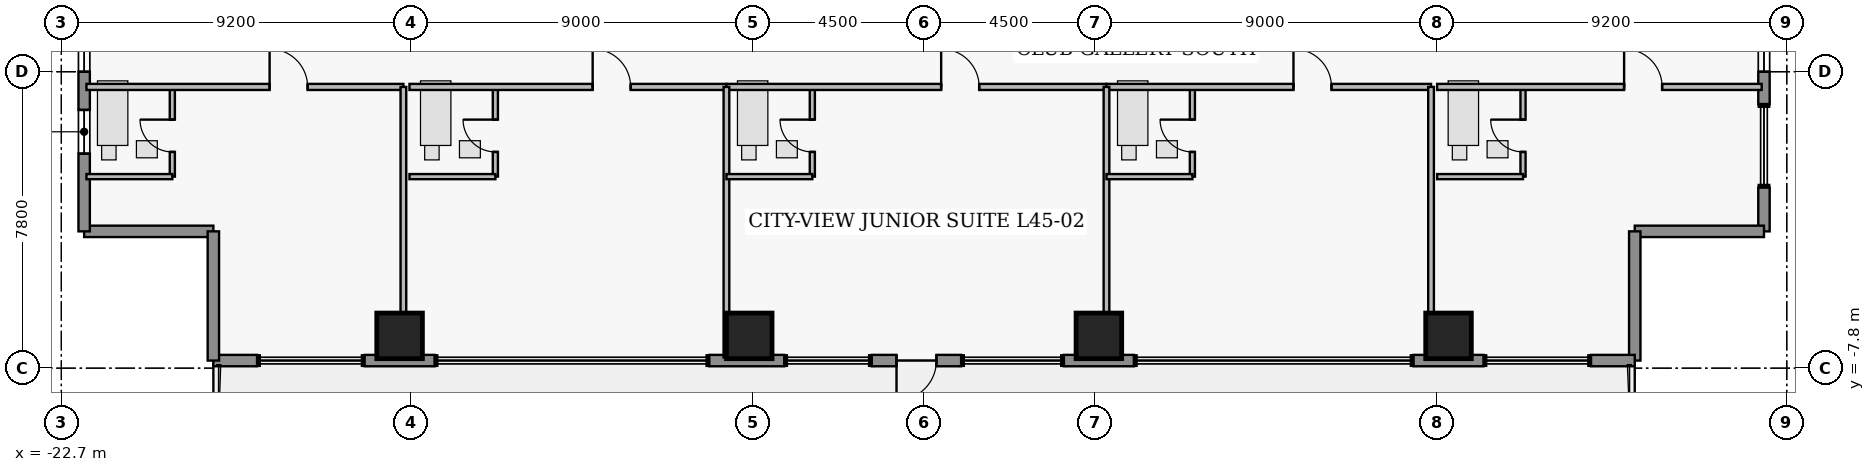
"""IFC4 building model, lengths in metres.
Left out: names, types, materials, properties, quantities, classifications, styles, units other than length and angle.
Written with IfcOpenShell. Run it as: python <this file> out.ifc"""

import sys

from ifc_helpers import new_model, si_unit, direction, frame, frame_2d, origin, origin_2d, place, context, subcontext, project, spatial, rectangle, extrude, element, fill, save


model = new_model("IFC4")
c1 = context("Model", 3, precision=1e-05, world=origin(), true_north=direction((0.0, 1.0)))
c2 = subcontext(c1, "Body", "Model", "MODEL_VIEW")
j1 = project(units=[si_unit("LENGTHUNIT", "METRE"), si_unit("PLANEANGLEUNIT", "RADIAN")], contexts=[c1])
p1 = place(None, origin())
s1 = spatial("IfcSite", under=j1, at=p1, CompositionType="ELEMENT")
p2 = place(p1, origin())
s2 = spatial("IfcBuilding", under=s1, at=p2, CompositionType="ELEMENT")
p3 = place(p2, frame((0.0, 0.0, 181.15)))
s3 = spatial("IfcBuildingStorey", under=s2, at=p3, CompositionType="ELEMENT", Elevation=181.15)
for number, where, z_axis, x_axis in (
    (1, (-13.8, -6.95, 0.0), (0.0, 0.0, 1.0), (1.0, 0.0, 0.0)),
    (2, (-4.6, -6.95, 0.0), (0.0, 0.0, 1.0), (1.0, 0.0, 0.0)),
    (3, (4.6, -6.95, 0.0), (0.0, 0.0, 1.0), (1.0, 0.0, 0.0)),
    (4, (13.8, -6.95, 0.0), (0.0, 0.0, 1.0), (1.0, 0.0, 0.0)),
):
    element("IfcColumn", number, at=place(p3, frame(where, z_axis=z_axis, x_axis=x_axis)), inside=s3, PredefinedType="COLUMN", context=c2, shape_type="SweptSolid", body=[
        extrude(rectangle(XDim=1.2, YDim=1.2, at=origin_2d()), origin(), (0.0, 0.0, 1.0), 3.75),
    ])
p4 = place(p3, frame((-18.7, -4.2, 0.0), z_axis=(0.0, 0.0, 1.0), x_axis=(-1.0, 0.0, 0.0)))
e5 = element("IfcWall", 5, at=p4, inside=s3, PredefinedType="STANDARD", context=c2, shape_type="SweptSolid", body=[
    extrude(rectangle(XDim=3.4, YDim=0.3, at=frame_2d((1.7, 0.0))), origin(), (0.0, 0.0, 1.0), 3.53),
])
p5 = place(p3, frame((-22.1, -4.2, 0.0), z_axis=(0.0, 0.0, 1.0), x_axis=(0.0, 1.0, 0.0)))
e6 = element("IfcWall", 6, at=p5, inside=s3, PredefinedType="STANDARD", context=c2, shape_type="SweptSolid", body=[
    extrude(rectangle(XDim=6.2, YDim=0.3, at=frame_2d((3.1, 0.0))), origin(), (0.0, 0.0, 1.0), 3.53),
])
p6 = place(p5, frame((2.045, 0.0, 0.95)))
e7 = element("IfcOpeningElement", 7, at=p6, cuts=e6, PredefinedType="OPENING", context=c2, shape_type="SweptSolid", body=[
    extrude(rectangle(XDim=1.15, YDim=1.55, at=frame_2d((0.575, 0.775))), frame((0.0, 0.16, 0.0), z_axis=(0.0, -1.0, 0.0), x_axis=(1.0, 0.0, 0.0)), (0.0, 0.0, 1.0), 0.32),
])
p7 = place(p5, frame((4.2, 0.0, 0.95)))
e8 = element("IfcOpeningElement", 8, at=p7, cuts=e6, PredefinedType="OPENING", context=c2, shape_type="SweptSolid", body=[
    extrude(rectangle(XDim=1.15, YDim=1.55, at=frame_2d((0.575, 0.775))), frame((0.0, 0.16, 0.0), z_axis=(0.0, -1.0, 0.0), x_axis=(1.0, 0.0, 0.0)), (0.0, 0.0, 1.0), 0.32),
])
p8 = place(p3, frame((22.1, 2.0, 0.0), z_axis=(0.0, 0.0, 1.0), x_axis=(0.0, -1.0, 0.0)))
e9 = element("IfcWall", 9, at=p8, inside=s3, PredefinedType="STANDARD", context=c2, shape_type="SweptSolid", body=[
    extrude(rectangle(XDim=2.85, YDim=0.3, at=frame_2d((1.425, 0.0))), origin(), (0.0, 0.0, 1.0), 3.53),
])
p9 = place(p8, frame((0.85, 0.0, 0.95)))
e10 = element("IfcOpeningElement", 10, at=p9, cuts=e9, PredefinedType="OPENING", context=c2, shape_type="SweptSolid", body=[
    extrude(rectangle(XDim=1.15, YDim=1.55, at=frame_2d((0.575, 0.775))), frame((0.0, 0.16, 0.0), z_axis=(0.0, -1.0, 0.0), x_axis=(1.0, 0.0, 0.0)), (0.0, 0.0, 1.0), 0.32),
])
p10 = place(p3, frame((22.1, -3.05, 0.0), z_axis=(0.0, 0.0, 1.0), x_axis=(0.0, -1.0, 0.0)))
e11 = element("IfcWall", 11, at=p10, inside=s3, PredefinedType="STANDARD", context=c2, shape_type="SweptSolid", body=[
    extrude(rectangle(XDim=1.15, YDim=0.3, at=frame_2d((0.575, 0.0))), origin(), (0.0, 0.0, 1.0), 3.53),
])
for number, where, z_axis, x_axis in (
    (12, (22.1, -4.2, 0.0), (0.0, 0.0, 1.0), (-1.0, 0.0, 0.0)),
    (13, (18.7, -4.2, 0.0), (0.0, 0.0, 1.0), (0.0, -1.0, 0.0)),
):
    element("IfcWall", number, at=place(p3, frame(where, z_axis=z_axis, x_axis=x_axis)), inside=s3, PredefinedType="STANDARD", context=c2, shape_type="SweptSolid", body=[
        extrude(rectangle(XDim=3.4, YDim=0.3, at=frame_2d((1.7, 0.0))), origin(), (0.0, 0.0, 1.0), 3.53),
    ])
p11 = place(p3, frame((18.7, -7.6, 0.0), z_axis=(0.0, 0.0, 1.0), x_axis=(-1.0, 0.0, 0.0)))
e14 = element("IfcWall", 14, at=p11, inside=s3, PredefinedType="STANDARD", context=c2, shape_type="SweptSolid", body=[
    extrude(rectangle(XDim=1.15, YDim=0.3, at=frame_2d((0.575, 0.0))), origin(), (0.0, 0.0, 1.0), 3.53),
])
for number, where, z_axis, x_axis in (
    (15, (14.72, -7.6, 0.0), (0.0, 0.0, 1.0), (-1.0, 0.0, 0.0)),
    (16, (5.52, -7.6, 0.0), (0.0, 0.0, 1.0), (-1.0, 0.0, 0.0)),
):
    element("IfcWall", number, at=place(p3, frame(where, z_axis=z_axis, x_axis=x_axis)), inside=s3, PredefinedType="STANDARD", context=c2, shape_type="SweptSolid", body=[
        extrude(rectangle(XDim=1.84, YDim=0.3, at=frame_2d((0.92, 0.0))), origin(), (0.0, 0.0, 1.0), 3.53),
    ])
p12 = place(p3, frame((0.975, -7.6, 0.0), z_axis=(0.0, 0.0, 1.0), x_axis=(-1.0, 0.0, 0.0)))
e17 = element("IfcWall", 17, at=p12, inside=s3, PredefinedType="STANDARD", context=c2, shape_type="SweptSolid", body=[
    extrude(rectangle(XDim=2.35, YDim=0.3, at=frame_2d((1.175, 0.0))), origin(), (0.0, 0.0, 1.0), 3.53),
])
p13 = place(p12, frame((0.65, 0.0, 0.0)))
e18 = element("IfcOpeningElement", 18, at=p13, cuts=e17, PredefinedType="OPENING", context=c2, shape_type="SweptSolid", body=[
    extrude(rectangle(XDim=1.05, YDim=2.2, at=frame_2d((0.525, 1.1))), frame((0.0, 0.16, 0.0), z_axis=(0.0, -1.0, 0.0), x_axis=(1.0, 0.0, 0.0)), (0.0, 0.0, 1.0), 0.32),
])
p14 = place(p3, frame((-3.68, -7.6, 0.0), z_axis=(0.0, 0.0, 1.0), x_axis=(-1.0, 0.0, 0.0)))
e19 = element("IfcWall", 19, at=p14, inside=s3, PredefinedType="STANDARD", context=c2, shape_type="SweptSolid", body=[
    extrude(rectangle(XDim=1.97, YDim=0.3, at=frame_2d((0.985, 0.0))), origin(), (0.0, 0.0, 1.0), 3.53),
])
p15 = place(p3, frame((-12.88, -7.6, 0.0), z_axis=(0.0, 0.0, 1.0), x_axis=(-1.0, 0.0, 0.0)))
e20 = element("IfcWall", 20, at=p15, inside=s3, PredefinedType="STANDARD", context=c2, shape_type="SweptSolid", body=[
    extrude(rectangle(XDim=1.84, YDim=0.3, at=frame_2d((0.92, 0.0))), origin(), (0.0, 0.0, 1.0), 3.53),
])
p16 = place(p3, frame((-17.55, -7.6, 0.0), z_axis=(0.0, 0.0, 1.0), x_axis=(-1.0, 0.0, 0.0)))
e21 = element("IfcWall", 21, at=p16, inside=s3, PredefinedType="STANDARD", context=c2, shape_type="SweptSolid", body=[
    extrude(rectangle(XDim=1.15, YDim=0.3, at=frame_2d((0.575, 0.0))), origin(), (0.0, 0.0, 1.0), 3.53),
])
p17 = place(p3, frame((-18.7, -7.6, 0.0), z_axis=(0.0, 0.0, 1.0), x_axis=(0.0, 1.0, 0.0)))
e22 = element("IfcWall", 22, at=p17, inside=s3, PredefinedType="STANDARD", context=c2, shape_type="SweptSolid", body=[
    extrude(rectangle(XDim=3.4, YDim=0.3, at=frame_2d((1.7, 0.0))), origin(), (0.0, 0.0, 1.0), 3.53),
])
p18 = place(p3, frame((-19.78, -2.76, 0.0), z_axis=(0.0, 0.0, 1.0), x_axis=(0.0, 1.0, 0.0)))
e23 = element("IfcWall", 23, at=p18, inside=s3, PredefinedType="PLUMBINGWALL", context=c2, shape_type="SweptSolid", body=[
    extrude(rectangle(XDim=2.36, YDim=0.135, at=frame_2d((1.18, 0.0))), origin(), (0.0, 0.0, 1.0), 3.53),
])
p19 = place(p18, frame((0.65, 0.0, 0.0)))
e24 = element("IfcOpeningElement", 24, at=p19, cuts=e23, PredefinedType="OPENING", context=c2, shape_type="SweptSolid", body=[
    extrude(rectangle(XDim=0.85, YDim=2.1, at=frame_2d((0.425, 1.05))), frame((0.0, 0.077, 0.0), z_axis=(0.0, -1.0, 0.0), x_axis=(1.0, 0.0, 0.0)), (0.0, 0.0, 1.0), 0.155),
])
p20 = place(p3, frame((-22.04, -0.4, 0.0), z_axis=(0.0, 0.0, 1.0), x_axis=(1.0, 0.0, 0.0)))
e25 = element("IfcWall", 25, at=p20, inside=s3, PredefinedType="PARTITIONING", context=c2, shape_type="SweptSolid", body=[
    extrude(rectangle(XDim=8.34, YDim=0.16, at=frame_2d((4.17, 0.0))), origin(), (0.0, 0.0, 1.0), 3.53),
])
p21 = place(p20, frame((4.82, 0.0, 0.0)))
e26 = element("IfcOpeningElement", 26, at=p21, cuts=e25, PredefinedType="OPENING", context=c2, shape_type="SweptSolid", body=[
    extrude(rectangle(XDim=1.0, YDim=2.15, at=frame_2d((0.5, 1.075))), frame((0.0, 0.09, 0.0), z_axis=(0.0, -1.0, 0.0), x_axis=(1.0, 0.0, 0.0)), (0.0, 0.0, 1.0), 0.18),
])
p22 = place(p3, frame((-11.28, -2.76, 0.0), z_axis=(0.0, 0.0, 1.0), x_axis=(0.0, 1.0, 0.0)))
e27 = element("IfcWall", 27, at=p22, inside=s3, PredefinedType="PLUMBINGWALL", context=c2, shape_type="SweptSolid", body=[
    extrude(rectangle(XDim=2.36, YDim=0.135, at=frame_2d((1.18, 0.0))), origin(), (0.0, 0.0, 1.0), 3.53),
])
p23 = place(p22, frame((0.65, 0.0, 0.0)))
e28 = element("IfcOpeningElement", 28, at=p23, cuts=e27, PredefinedType="OPENING", context=c2, shape_type="SweptSolid", body=[
    extrude(rectangle(XDim=0.85, YDim=2.1, at=frame_2d((0.425, 1.05))), frame((0.0, 0.077, 0.0), z_axis=(0.0, -1.0, 0.0), x_axis=(1.0, 0.0, 0.0)), (0.0, 0.0, 1.0), 0.155),
])
p24 = place(p3, frame((-13.54, -0.4, 0.0), z_axis=(0.0, 0.0, 1.0), x_axis=(1.0, 0.0, 0.0)))
e29 = element("IfcWall", 29, at=p24, inside=s3, PredefinedType="PARTITIONING", context=c2, shape_type="SweptSolid", body=[
    extrude(rectangle(XDim=8.34, YDim=0.16, at=frame_2d((4.17, 0.0))), origin(), (0.0, 0.0, 1.0), 3.53),
])
p25 = place(p24, frame((4.82, 0.0, 0.0)))
e30 = element("IfcOpeningElement", 30, at=p25, cuts=e29, PredefinedType="OPENING", context=c2, shape_type="SweptSolid", body=[
    extrude(rectangle(XDim=1.0, YDim=2.15, at=frame_2d((0.5, 1.075))), frame((0.0, 0.09, 0.0), z_axis=(0.0, -1.0, 0.0), x_axis=(1.0, 0.0, 0.0)), (0.0, 0.0, 1.0), 0.18),
])
p26 = place(p3, frame((-2.94, -2.76, 0.0), z_axis=(0.0, 0.0, 1.0), x_axis=(0.0, 1.0, 0.0)))
e31 = element("IfcWall", 31, at=p26, inside=s3, PredefinedType="PLUMBINGWALL", context=c2, shape_type="SweptSolid", body=[
    extrude(rectangle(XDim=2.36, YDim=0.135, at=frame_2d((1.18, 0.0))), origin(), (0.0, 0.0, 1.0), 3.53),
])
p27 = place(p26, frame((0.65, 0.0, 0.0)))
e32 = element("IfcOpeningElement", 32, at=p27, cuts=e31, PredefinedType="OPENING", context=c2, shape_type="SweptSolid", body=[
    extrude(rectangle(XDim=0.85, YDim=2.1, at=frame_2d((0.425, 1.05))), frame((0.0, 0.077, 0.0), z_axis=(0.0, -1.0, 0.0), x_axis=(1.0, 0.0, 0.0)), (0.0, 0.0, 1.0), 0.155),
])
p28 = place(p3, frame((-5.2, -0.4, 0.0), z_axis=(0.0, 0.0, 1.0), x_axis=(1.0, 0.0, 0.0)))
e33 = element("IfcWall", 33, at=p28, inside=s3, PredefinedType="PARTITIONING", context=c2, shape_type="SweptSolid", body=[
    extrude(rectangle(XDim=10.0, YDim=0.16, at=frame_2d((5.0, 0.0))), origin(), (0.0, 0.0, 1.0), 3.53),
])
p29 = place(p28, frame((5.65, 0.0, 0.0)))
e34 = element("IfcOpeningElement", 34, at=p29, cuts=e33, PredefinedType="OPENING", context=c2, shape_type="SweptSolid", body=[
    extrude(rectangle(XDim=1.0, YDim=2.15, at=frame_2d((0.5, 1.075))), frame((0.0, 0.09, 0.0), z_axis=(0.0, -1.0, 0.0), x_axis=(1.0, 0.0, 0.0)), (0.0, 0.0, 1.0), 0.18),
])
p30 = place(p3, frame((7.06, -2.76, 0.0), z_axis=(0.0, 0.0, 1.0), x_axis=(0.0, 1.0, 0.0)))
e35 = element("IfcWall", 35, at=p30, inside=s3, PredefinedType="PLUMBINGWALL", context=c2, shape_type="SweptSolid", body=[
    extrude(rectangle(XDim=2.36, YDim=0.135, at=frame_2d((1.18, 0.0))), origin(), (0.0, 0.0, 1.0), 3.53),
])
p31 = place(p30, frame((0.65, 0.0, 0.0)))
e36 = element("IfcOpeningElement", 36, at=p31, cuts=e35, PredefinedType="OPENING", context=c2, shape_type="SweptSolid", body=[
    extrude(rectangle(XDim=0.85, YDim=2.1, at=frame_2d((0.425, 1.05))), frame((0.0, 0.077, 0.0), z_axis=(0.0, -1.0, 0.0), x_axis=(1.0, 0.0, 0.0)), (0.0, 0.0, 1.0), 0.155),
])
p32 = place(p3, frame((4.8, -0.4, 0.0), z_axis=(0.0, 0.0, 1.0), x_axis=(1.0, 0.0, 0.0)))
e37 = element("IfcWall", 37, at=p32, inside=s3, PredefinedType="PARTITIONING", context=c2, shape_type="SweptSolid", body=[
    extrude(rectangle(XDim=8.54, YDim=0.16, at=frame_2d((4.27, 0.0))), origin(), (0.0, 0.0, 1.0), 3.53),
])
p33 = place(p32, frame((4.92, 0.0, 0.0)))
e38 = element("IfcOpeningElement", 38, at=p33, cuts=e37, PredefinedType="OPENING", context=c2, shape_type="SweptSolid", body=[
    extrude(rectangle(XDim=1.0, YDim=2.15, at=frame_2d((0.5, 1.075))), frame((0.0, 0.09, 0.0), z_axis=(0.0, -1.0, 0.0), x_axis=(1.0, 0.0, 0.0)), (0.0, 0.0, 1.0), 0.18),
])
p34 = place(p3, frame((15.76, -2.76, 0.0), z_axis=(0.0, 0.0, 1.0), x_axis=(0.0, 1.0, 0.0)))
e39 = element("IfcWall", 39, at=p34, inside=s3, PredefinedType="PLUMBINGWALL", context=c2, shape_type="SweptSolid", body=[
    extrude(rectangle(XDim=2.36, YDim=0.135, at=frame_2d((1.18, 0.0))), origin(), (0.0, 0.0, 1.0), 3.53),
])
p35 = place(p34, frame((0.65, 0.0, 0.0)))
e40 = element("IfcOpeningElement", 40, at=p35, cuts=e39, PredefinedType="OPENING", context=c2, shape_type="SweptSolid", body=[
    extrude(rectangle(XDim=0.85, YDim=2.1, at=frame_2d((0.425, 1.05))), frame((0.0, 0.077, 0.0), z_axis=(0.0, -1.0, 0.0), x_axis=(1.0, 0.0, 0.0)), (0.0, 0.0, 1.0), 0.155),
])
p36 = place(p3, frame((13.5, -0.4, 0.0), z_axis=(0.0, 0.0, 1.0), x_axis=(1.0, 0.0, 0.0)))
e41 = element("IfcWall", 41, at=p36, inside=s3, PredefinedType="PARTITIONING", context=c2, shape_type="SweptSolid", body=[
    extrude(rectangle(XDim=8.54, YDim=0.16, at=frame_2d((4.27, 0.0))), origin(), (0.0, 0.0, 1.0), 3.53),
])
p37 = place(p36, frame((4.92, 0.0, 0.0)))
e42 = element("IfcOpeningElement", 42, at=p37, cuts=e41, PredefinedType="OPENING", context=c2, shape_type="SweptSolid", body=[
    extrude(rectangle(XDim=1.0, YDim=2.15, at=frame_2d((0.5, 1.075))), frame((0.0, 0.09, 0.0), z_axis=(0.0, -1.0, 0.0), x_axis=(1.0, 0.0, 0.0)), (0.0, 0.0, 1.0), 0.18),
])
p38 = place(p3, frame((-22.04, -2.76, 0.0), z_axis=(0.0, 0.0, 1.0), x_axis=(1.0, 0.0, 0.0)))
e43 = element("IfcWall", 43, at=p38, inside=s3, PredefinedType="PLUMBINGWALL", context=c2, shape_type="SweptSolid", body=[
    extrude(rectangle(XDim=2.26, YDim=0.135, at=frame_2d((1.13, 0.0))), origin(), (0.0, 0.0, 1.0), 3.53),
])
p39 = place(p3, frame((-13.7, -7.52, 0.0), z_axis=(0.0, 0.0, 1.0), x_axis=(0.0, 1.0, 0.0)))
e44 = element("IfcWall", 44, at=p39, inside=s3, PredefinedType="PARTITIONING", context=c2, shape_type="SweptSolid", body=[
    extrude(rectangle(XDim=7.12, YDim=0.15, at=frame_2d((3.56, 0.0))), origin(), (0.0, 0.0, 1.0), 2.923),
])
p40 = place(p3, frame((-13.54, -2.76, 0.0), z_axis=(0.0, 0.0, 1.0), x_axis=(1.0, 0.0, 0.0)))
e45 = element("IfcWall", 45, at=p40, inside=s3, PredefinedType="PLUMBINGWALL", context=c2, shape_type="SweptSolid", body=[
    extrude(rectangle(XDim=2.26, YDim=0.135, at=frame_2d((1.13, 0.0))), origin(), (0.0, 0.0, 1.0), 3.124),
])
p41 = place(p3, frame((-5.2, -7.52, 0.0), z_axis=(0.0, 0.0, 1.0), x_axis=(0.0, 1.0, 0.0)))
e46 = element("IfcWall", 46, at=p41, inside=s3, PredefinedType="PARTITIONING", context=c2, shape_type="SweptSolid", body=[
    extrude(rectangle(XDim=7.12, YDim=0.15, at=frame_2d((3.56, 0.0))), origin(), (0.0, 0.0, 1.0), 3.53),
])
p42 = place(p3, frame((-5.2, -2.76, 0.0), z_axis=(0.0, 0.0, 1.0), x_axis=(1.0, 0.0, 0.0)))
e47 = element("IfcWall", 47, at=p42, inside=s3, PredefinedType="PLUMBINGWALL", context=c2, shape_type="SweptSolid", body=[
    extrude(rectangle(XDim=2.26, YDim=0.135, at=frame_2d((1.13, 0.0))), origin(), (0.0, 0.0, 1.0), 3.124),
])
p43 = place(p3, frame((4.8, -7.52, 0.0), z_axis=(0.0, 0.0, 1.0), x_axis=(0.0, 1.0, 0.0)))
e48 = element("IfcWall", 48, at=p43, inside=s3, PredefinedType="PARTITIONING", context=c2, shape_type="SweptSolid", body=[
    extrude(rectangle(XDim=7.12, YDim=0.15, at=frame_2d((3.56, 0.0))), origin(), (0.0, 0.0, 1.0), 2.923),
])
p44 = place(p3, frame((4.8, -2.76, 0.0), z_axis=(0.0, 0.0, 1.0), x_axis=(1.0, 0.0, 0.0)))
e49 = element("IfcWall", 49, at=p44, inside=s3, PredefinedType="PLUMBINGWALL", context=c2, shape_type="SweptSolid", body=[
    extrude(rectangle(XDim=2.26, YDim=0.135, at=frame_2d((1.13, 0.0))), origin(), (0.0, 0.0, 1.0), 3.124),
])
p45 = place(p3, frame((13.34, -7.52, 0.0), z_axis=(0.0, 0.0, 1.0), x_axis=(0.0, 1.0, 0.0)))
e50 = element("IfcWall", 50, at=p45, inside=s3, PredefinedType="PARTITIONING", context=c2, shape_type="SweptSolid", body=[
    extrude(rectangle(XDim=7.12, YDim=0.15, at=frame_2d((3.56, 0.0))), origin(), (0.0, 0.0, 1.0), 2.923),
])
p46 = place(p3, frame((13.5, -2.76, 0.0), z_axis=(0.0, 0.0, 1.0), x_axis=(1.0, 0.0, 0.0)))
e51 = element("IfcWall", 51, at=p46, inside=s3, PredefinedType="PLUMBINGWALL", context=c2, shape_type="SweptSolid", body=[
    extrude(rectangle(XDim=2.26, YDim=0.135, at=frame_2d((1.13, 0.0))), origin(), (0.0, 0.0, 1.0), 3.53),
])
p47 = place(p6, origin())
e52 = element("IfcWindow", 52, at=p47, inside=s3, PartitioningType="SINGLE_PANEL", PredefinedType="WINDOW", context=c2, shape_type="SweptSolid", body=[
    extrude(rectangle(XDim=1.15, YDim=1.55, at=frame_2d((0.575, 0.775))), frame((0.0, 0.03, 0.0), z_axis=(0.0, -1.0, 0.0), x_axis=(1.0, 0.0, 0.0)), (0.0, 0.0, 1.0), 0.06),
])
fill(e7, e52)
p48 = place(p7, origin())
e53 = element("IfcWindow", 53, at=p48, inside=s3, PartitioningType="SINGLE_PANEL", PredefinedType="WINDOW", context=c2, shape_type="SweptSolid", body=[
    extrude(rectangle(XDim=1.15, YDim=1.55, at=frame_2d((0.575, 0.775))), frame((0.0, 0.03, 0.0), z_axis=(0.0, -1.0, 0.0), x_axis=(1.0, 0.0, 0.0)), (0.0, 0.0, 1.0), 0.06),
])
fill(e8, e53)
p49 = place(p9, origin())
e54 = element("IfcWindow", 54, at=p49, inside=s3, PartitioningType="SINGLE_PANEL", PredefinedType="WINDOW", context=c2, shape_type="SweptSolid", body=[
    extrude(rectangle(XDim=1.15, YDim=1.55, at=frame_2d((0.575, 0.775))), frame((0.0, 0.03, 0.0), z_axis=(0.0, -1.0, 0.0), x_axis=(1.0, 0.0, 0.0)), (0.0, 0.0, 1.0), 0.06),
])
fill(e10, e54)
p50 = place(p13, origin())
e55 = element("IfcDoor", 55, at=p50, inside=s3, OperationType="SINGLE_SWING_RIGHT", PredefinedType="DOOR", context=c2, shape_type="SweptSolid", body=[
    extrude(rectangle(XDim=1.05, YDim=2.2, at=frame_2d((0.525, 1.1))), frame((0.0, 0.025, 0.0), z_axis=(0.0, -1.0, 0.0), x_axis=(1.0, 0.0, 0.0)), (0.0, 0.0, 1.0), 0.05),
])
fill(e18, e55)
p51 = place(p19, origin())
e56 = element("IfcDoor", 56, at=p51, inside=s3, OperationType="SINGLE_SWING_RIGHT", PredefinedType="DOOR", context=c2, shape_type="SweptSolid", body=[
    extrude(rectangle(XDim=0.85, YDim=2.1, at=frame_2d((0.425, 1.05))), frame((0.0, 0.025, 0.0), z_axis=(0.0, -1.0, 0.0), x_axis=(1.0, 0.0, 0.0)), (0.0, 0.0, 1.0), 0.05),
])
fill(e24, e56)
p52 = place(p21, origin())
e57 = element("IfcDoor", 57, at=p52, inside=s3, OperationType="SINGLE_SWING_LEFT", PredefinedType="DOOR", context=c2, shape_type="SweptSolid", body=[
    extrude(rectangle(XDim=1.0, YDim=2.15, at=frame_2d((0.5, 1.075))), frame((0.0, 0.025, 0.0), z_axis=(0.0, -1.0, 0.0), x_axis=(1.0, 0.0, 0.0)), (0.0, 0.0, 1.0), 0.05),
])
fill(e26, e57)
p53 = place(p23, origin())
e58 = element("IfcDoor", 58, at=p53, inside=s3, OperationType="SINGLE_SWING_RIGHT", PredefinedType="DOOR", context=c2, shape_type="SweptSolid", body=[
    extrude(rectangle(XDim=0.85, YDim=2.1, at=frame_2d((0.425, 1.05))), frame((0.0, 0.025, 0.0), z_axis=(0.0, -1.0, 0.0), x_axis=(1.0, 0.0, 0.0)), (0.0, 0.0, 1.0), 0.05),
])
fill(e28, e58)
p54 = place(p25, origin())
e59 = element("IfcDoor", 59, at=p54, inside=s3, OperationType="SINGLE_SWING_LEFT", PredefinedType="DOOR", context=c2, shape_type="SweptSolid", body=[
    extrude(rectangle(XDim=1.0, YDim=2.15, at=frame_2d((0.5, 1.075))), frame((0.0, 0.025, 0.0), z_axis=(0.0, -1.0, 0.0), x_axis=(1.0, 0.0, 0.0)), (0.0, 0.0, 1.0), 0.05),
])
fill(e30, e59)
p55 = place(p27, origin())
e60 = element("IfcDoor", 60, at=p55, inside=s3, OperationType="SINGLE_SWING_RIGHT", PredefinedType="DOOR", context=c2, shape_type="SweptSolid", body=[
    extrude(rectangle(XDim=0.85, YDim=2.1, at=frame_2d((0.425, 1.05))), frame((0.0, 0.025, 0.0), z_axis=(0.0, -1.0, 0.0), x_axis=(1.0, 0.0, 0.0)), (0.0, 0.0, 1.0), 0.05),
])
fill(e32, e60)
p56 = place(p29, origin())
e61 = element("IfcDoor", 61, at=p56, inside=s3, OperationType="SINGLE_SWING_LEFT", PredefinedType="DOOR", context=c2, shape_type="SweptSolid", body=[
    extrude(rectangle(XDim=1.0, YDim=2.15, at=frame_2d((0.5, 1.075))), frame((0.0, 0.025, 0.0), z_axis=(0.0, -1.0, 0.0), x_axis=(1.0, 0.0, 0.0)), (0.0, 0.0, 1.0), 0.05),
])
fill(e34, e61)
p57 = place(p31, origin())
e62 = element("IfcDoor", 62, at=p57, inside=s3, OperationType="SINGLE_SWING_RIGHT", PredefinedType="DOOR", context=c2, shape_type="SweptSolid", body=[
    extrude(rectangle(XDim=0.85, YDim=2.1, at=frame_2d((0.425, 1.05))), frame((0.0, 0.025, 0.0), z_axis=(0.0, -1.0, 0.0), x_axis=(1.0, 0.0, 0.0)), (0.0, 0.0, 1.0), 0.05),
])
fill(e36, e62)
p58 = place(p33, origin())
e63 = element("IfcDoor", 63, at=p58, inside=s3, OperationType="SINGLE_SWING_LEFT", PredefinedType="DOOR", context=c2, shape_type="SweptSolid", body=[
    extrude(rectangle(XDim=1.0, YDim=2.15, at=frame_2d((0.5, 1.075))), frame((0.0, 0.025, 0.0), z_axis=(0.0, -1.0, 0.0), x_axis=(1.0, 0.0, 0.0)), (0.0, 0.0, 1.0), 0.05),
])
fill(e38, e63)
p59 = place(p35, origin())
e64 = element("IfcDoor", 64, at=p59, inside=s3, OperationType="SINGLE_SWING_RIGHT", PredefinedType="DOOR", context=c2, shape_type="SweptSolid", body=[
    extrude(rectangle(XDim=0.85, YDim=2.1, at=frame_2d((0.425, 1.05))), frame((0.0, 0.025, 0.0), z_axis=(0.0, -1.0, 0.0), x_axis=(1.0, 0.0, 0.0)), (0.0, 0.0, 1.0), 0.05),
])
fill(e40, e64)
p60 = place(p37, origin())
e65 = element("IfcDoor", 65, at=p60, inside=s3, OperationType="SINGLE_SWING_LEFT", PredefinedType="DOOR", context=c2, shape_type="SweptSolid", body=[
    extrude(rectangle(XDim=1.0, YDim=2.15, at=frame_2d((0.5, 1.075))), frame((0.0, 0.025, 0.0), z_axis=(0.0, -1.0, 0.0), x_axis=(1.0, 0.0, 0.0)), (0.0, 0.0, 1.0), 0.05),
])
fill(e42, e65)
save(model, sys.argv[1])
